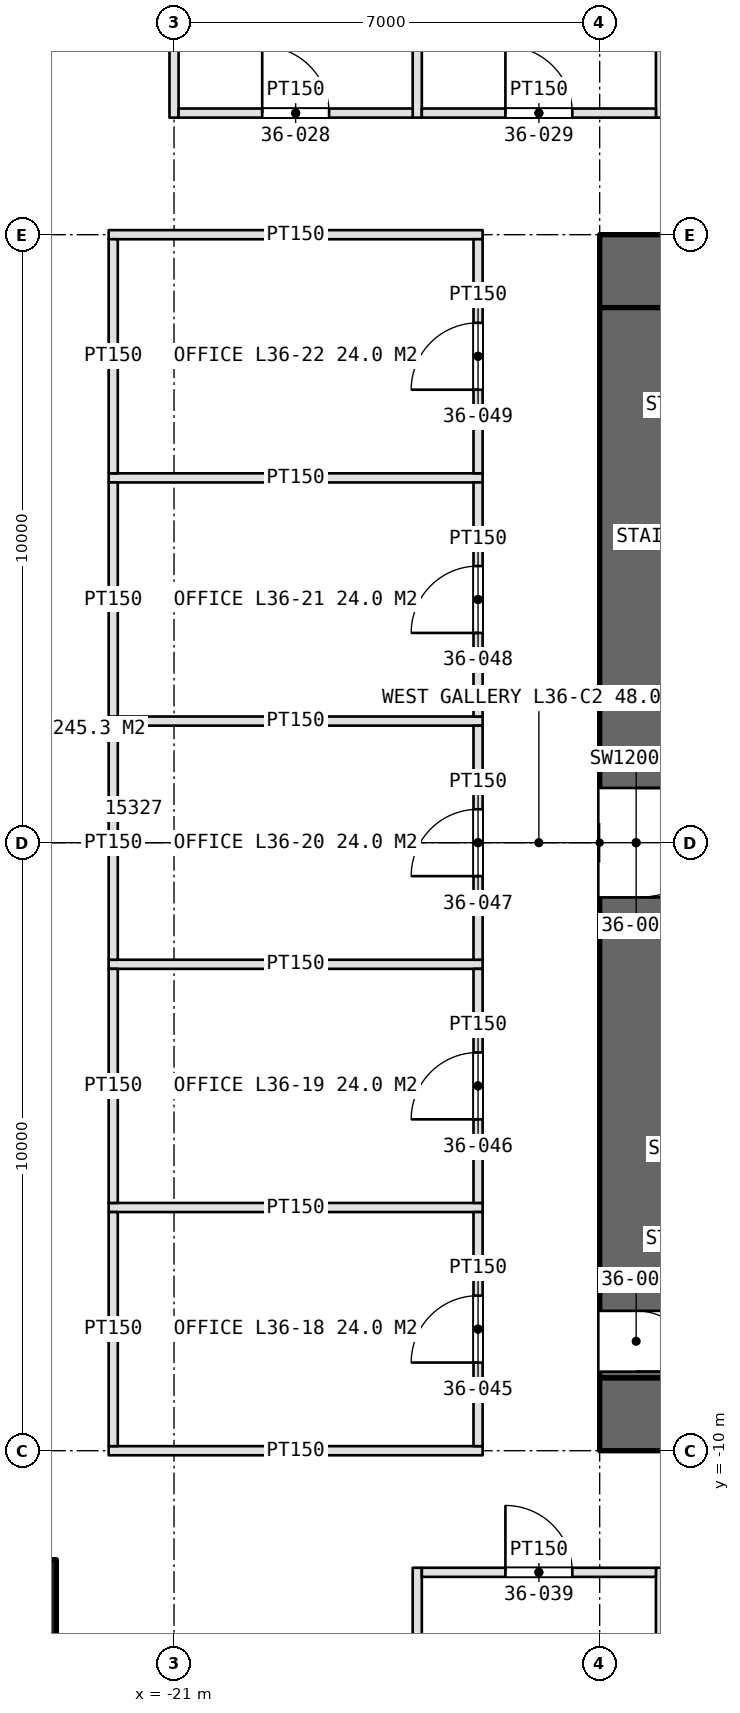
"""IFC4 building model, lengths in metres.
Left out: names, types, materials, properties, quantities, classifications, styles, units other than length and angle.
Written with IfcOpenShell. Run it as: python <this file> out.ifc"""

import sys

from ifc_helpers import new_model, si_unit, direction, frame, frame_2d, origin, origin_2d, place, context, subcontext, project, spatial, rectangle, extrude, element, fill, save


model = new_model("IFC4")
c1 = context("Model", 3, precision=1e-05, world=origin(), true_north=direction((0.0, 1.0)))
c2 = subcontext(c1, "Body", "Model", "MODEL_VIEW")
j1 = project(units=[si_unit("LENGTHUNIT", "METRE"), si_unit("PLANEANGLEUNIT", "RADIAN")], contexts=[c1])
p1 = place(None, origin())
s1 = spatial("IfcSite", under=j1, at=p1, CompositionType="ELEMENT")
p2 = place(p1, origin())
s2 = spatial("IfcBuilding", under=s1, at=p2, CompositionType="ELEMENT")
p3 = place(p2, frame((0.0, 0.0, 168.0)))
s3 = spatial("IfcBuildingStorey", under=s2, at=p3, CompositionType="ELEMENT", Elevation=168.0)
p4 = place(p3, frame((-14.0, -9.4, 0.0), z_axis=(0.0, 0.0, 1.0), x_axis=(1.0, 0.0, 0.0)))
e1 = element("IfcWall", 1, at=p4, inside=s3, PredefinedType="SHEAR", context=c2, shape_type="SweptSolid", body=[
    extrude(rectangle(XDim=28.0, YDim=1.2, at=frame_2d((14.0, 0.0))), origin(), (0.0, 0.0, 1.0), 4.2),
])
p5 = place(p4, frame((13.1, 0.0, 0.0)))
e2 = element("IfcOpeningElement", 2, at=p5, cuts=e1, PredefinedType="OPENING", context=c2, shape_type="SweptSolid", body=[
    extrude(rectangle(XDim=1.8, YDim=2.4, at=frame_2d((0.9, 1.2))), frame((0.0, 0.61, 0.0), z_axis=(0.0, -1.0, 0.0), x_axis=(1.0, 0.0, 0.0)), (0.0, 0.0, 1.0), 1.22),
])
p6 = place(p4, frame((22.9, 0.0, 0.0)))
e3 = element("IfcOpeningElement", 3, at=p6, cuts=e1, PredefinedType="OPENING", context=c2, shape_type="SweptSolid", body=[
    extrude(rectangle(XDim=2.2, YDim=2.7, at=frame_2d((1.1, 1.35))), frame((0.0, 0.61, 0.0), z_axis=(0.0, -1.0, 0.0), x_axis=(1.0, 0.0, 0.0)), (0.0, 0.0, 1.0), 1.22),
])
p7 = place(p3, frame((14.0, 9.4, 0.0), z_axis=(0.0, 0.0, 1.0), x_axis=(-1.0, 0.0, 0.0)))
e4 = element("IfcWall", 4, at=p7, inside=s3, PredefinedType="SHEAR", context=c2, shape_type="SweptSolid", body=[
    extrude(rectangle(XDim=28.0, YDim=1.2, at=frame_2d((14.0, 0.0))), origin(), (0.0, 0.0, 1.0), 4.2),
])
p8 = place(p7, frame((24.0, 0.0, 0.0)))
e5 = element("IfcOpeningElement", 5, at=p8, cuts=e4, PredefinedType="OPENING", context=c2, shape_type="SweptSolid", body=[
    extrude(rectangle(XDim=1.0, YDim=2.4, at=frame_2d((0.5, 1.2))), frame((0.0, 0.61, 0.0), z_axis=(0.0, -1.0, 0.0), x_axis=(1.0, 0.0, 0.0)), (0.0, 0.0, 1.0), 1.22),
])
p9 = place(p7, frame((13.1, 0.0, 0.0)))
e6 = element("IfcOpeningElement", 6, at=p9, cuts=e4, PredefinedType="OPENING", context=c2, shape_type="SweptSolid", body=[
    extrude(rectangle(XDim=1.8, YDim=2.4, at=frame_2d((0.9, 1.2))), frame((0.0, 0.61, 0.0), z_axis=(0.0, -1.0, 0.0), x_axis=(1.0, 0.0, 0.0)), (0.0, 0.0, 1.0), 1.22),
])
p10 = place(p3, frame((-13.4, 8.8, 0.0), z_axis=(0.0, 0.0, 1.0), x_axis=(0.0, -1.0, 0.0)))
e7 = element("IfcWall", 7, at=p10, inside=s3, PredefinedType="SHEAR", context=c2, shape_type="SweptSolid", body=[
    extrude(rectangle(XDim=17.6, YDim=1.2, at=frame_2d((8.8, 0.0))), origin(), (0.0, 0.0, 1.0), 4.2),
])
p11 = place(p10, frame((7.9, 0.0, 0.0)))
e8 = element("IfcOpeningElement", 8, at=p11, cuts=e7, PredefinedType="OPENING", context=c2, shape_type="SweptSolid", body=[
    extrude(rectangle(XDim=1.8, YDim=2.4, at=frame_2d((0.9, 1.2))), frame((0.0, 0.61, 0.0), z_axis=(0.0, -1.0, 0.0), x_axis=(1.0, 0.0, 0.0)), (0.0, 0.0, 1.0), 1.22),
])
p12 = place(p10, frame((16.5, 0.0, 0.0)))
e9 = element("IfcOpeningElement", 9, at=p12, cuts=e7, PredefinedType="OPENING", context=c2, shape_type="SweptSolid", body=[
    extrude(rectangle(XDim=1.0, YDim=2.4, at=frame_2d((0.5, 1.2))), frame((0.0, 0.61, 0.0), z_axis=(0.0, -1.0, 0.0), x_axis=(1.0, 0.0, 0.0)), (0.0, 0.0, 1.0), 1.22),
])
p13 = place(p3, frame((-23.635, -12.493, 0.0), z_axis=(0.0, 0.0, 1.0), x_axis=(1.0, 0.0, 0.0)))
e10 = element("IfcColumn", 10, at=p13, inside=s3, PredefinedType="COLUMN", context=c2, shape_type="SweptSolid", body=[
    extrude(rectangle(XDim=1.4, YDim=1.4, at=origin_2d()), origin(), (0.0, 0.0, 1.0), 4.2),
])
for number, where, z_axis, x_axis in (
    (11, (-21.0, 11.925, 0.0), (0.0, 0.0, 1.0), (0.0, 1.0, 0.0)),
    (12, (-17.0, 11.925, 0.0), (0.0, 0.0, 1.0), (0.0, 1.0, 0.0)),
    (13, (-13.0, 11.925, 0.0), (0.0, 0.0, 1.0), (0.0, 1.0, 0.0)),
):
    element("IfcWall", number, at=place(p3, frame(where, z_axis=z_axis, x_axis=x_axis)), inside=s3, PredefinedType="PARTITIONING", context=c2, shape_type="SweptSolid", body=[
        extrude(rectangle(XDim=6.15, YDim=0.15, at=frame_2d((3.075, 0.0))), origin(), (0.0, 0.0, 1.0), 3.0),
    ])
p14 = place(p3, frame((-20.925, 12.0, 0.0), z_axis=(0.0, 0.0, 1.0), x_axis=(1.0, 0.0, 0.0)))
e14 = element("IfcWall", 14, at=p14, inside=s3, PredefinedType="PARTITIONING", context=c2, shape_type="SweptSolid", body=[
    extrude(rectangle(XDim=3.85, YDim=0.15, at=frame_2d((1.925, 0.0))), origin(), (0.0, 0.0, 1.0), 3.0),
])
p15 = place(p14, frame((1.375, 0.0, 0.0)))
e15 = element("IfcOpeningElement", 15, at=p15, cuts=e14, PredefinedType="OPENING", context=c2, shape_type="SweptSolid", body=[
    extrude(rectangle(XDim=1.1, YDim=2.3, at=frame_2d((0.55, 1.15))), frame((0.0, 0.085, 0.0), z_axis=(0.0, -1.0, 0.0), x_axis=(1.0, 0.0, 0.0)), (0.0, 0.0, 1.0), 0.17),
])
p16 = place(p3, frame((-16.925, 12.0, 0.0), z_axis=(0.0, 0.0, 1.0), x_axis=(1.0, 0.0, 0.0)))
e16 = element("IfcWall", 16, at=p16, inside=s3, PredefinedType="PARTITIONING", context=c2, shape_type="SweptSolid", body=[
    extrude(rectangle(XDim=3.85, YDim=0.15, at=frame_2d((1.925, 0.0))), origin(), (0.0, 0.0, 1.0), 3.0),
])
p17 = place(p16, frame((1.375, 0.0, 0.0)))
e17 = element("IfcOpeningElement", 17, at=p17, cuts=e16, PredefinedType="OPENING", context=c2, shape_type="SweptSolid", body=[
    extrude(rectangle(XDim=1.1, YDim=2.3, at=frame_2d((0.55, 1.15))), frame((0.0, 0.085, 0.0), z_axis=(0.0, -1.0, 0.0), x_axis=(1.0, 0.0, 0.0)), (0.0, 0.0, 1.0), 0.17),
])
for number, where, z_axis, x_axis in (
    (18, (-17.0, -11.925, 0.0), (0.0, 0.0, 1.0), (0.0, -1.0, 0.0)),
    (19, (-13.0, -11.925, 0.0), (0.0, 0.0, 1.0), (0.0, -1.0, 0.0)),
):
    element("IfcWall", number, at=place(p3, frame(where, z_axis=z_axis, x_axis=x_axis)), inside=s3, PredefinedType="PARTITIONING", context=c2, shape_type="SweptSolid", body=[
        extrude(rectangle(XDim=6.15, YDim=0.15, at=frame_2d((3.075, 0.0))), origin(), (0.0, 0.0, 1.0), 3.0),
    ])
p18 = place(p3, frame((-16.925, -12.0, 0.0), z_axis=(0.0, 0.0, 1.0), x_axis=(1.0, 0.0, 0.0)))
e20 = element("IfcWall", 20, at=p18, inside=s3, PredefinedType="PARTITIONING", context=c2, shape_type="SweptSolid", body=[
    extrude(rectangle(XDim=3.85, YDim=0.15, at=frame_2d((1.925, 0.0))), origin(), (0.0, 0.0, 1.0), 3.0),
])
p19 = place(p18, frame((1.375, 0.0, 0.0)))
e21 = element("IfcOpeningElement", 21, at=p19, cuts=e20, PredefinedType="OPENING", context=c2, shape_type="SweptSolid", body=[
    extrude(rectangle(XDim=1.1, YDim=2.3, at=frame_2d((0.55, 1.15))), frame((0.0, 0.085, 0.0), z_axis=(0.0, -1.0, 0.0), x_axis=(1.0, 0.0, 0.0)), (0.0, 0.0, 1.0), 0.17),
])
for number, where, z_axis, x_axis in (
    (22, (-15.925, -10.0, 0.0), (0.0, 0.0, 1.0), (-1.0, 0.0, 0.0)),
    (23, (-15.925, -6.0, 0.0), (0.0, 0.0, 1.0), (-1.0, 0.0, 0.0)),
    (24, (-15.925, -2.0, 0.0), (0.0, 0.0, 1.0), (-1.0, 0.0, 0.0)),
    (25, (-15.925, 2.0, 0.0), (0.0, 0.0, 1.0), (-1.0, 0.0, 0.0)),
    (26, (-15.925, 6.0, 0.0), (0.0, 0.0, 1.0), (-1.0, 0.0, 0.0)),
    (27, (-15.925, 10.0, 0.0), (0.0, 0.0, 1.0), (-1.0, 0.0, 0.0)),
):
    element("IfcWall", number, at=place(p3, frame(where, z_axis=z_axis, x_axis=x_axis)), inside=s3, PredefinedType="PARTITIONING", context=c2, shape_type="SweptSolid", body=[
        extrude(rectangle(XDim=6.15, YDim=0.15, at=frame_2d((3.075, 0.0))), origin(), (0.0, 0.0, 1.0), 3.0),
    ])
p20 = place(p3, frame((-16.0, -9.925, 0.0), z_axis=(0.0, 0.0, 1.0), x_axis=(0.0, 1.0, 0.0)))
e28 = element("IfcWall", 28, at=p20, inside=s3, PredefinedType="PARTITIONING", context=c2, shape_type="SweptSolid", body=[
    extrude(rectangle(XDim=3.85, YDim=0.15, at=frame_2d((1.925, 0.0))), origin(), (0.0, 0.0, 1.0), 3.0),
])
p21 = place(p20, frame((1.375, 0.0, 0.0)))
e29 = element("IfcOpeningElement", 29, at=p21, cuts=e28, PredefinedType="OPENING", context=c2, shape_type="SweptSolid", body=[
    extrude(rectangle(XDim=1.1, YDim=2.3, at=frame_2d((0.55, 1.15))), frame((0.0, 0.085, 0.0), z_axis=(0.0, -1.0, 0.0), x_axis=(1.0, 0.0, 0.0)), (0.0, 0.0, 1.0), 0.17),
])
p22 = place(p3, frame((-22.0, -9.925, 0.0), z_axis=(0.0, 0.0, 1.0), x_axis=(0.0, 1.0, 0.0)))
e30 = element("IfcWall", 30, at=p22, inside=s3, PredefinedType="PARTITIONING", context=c2, shape_type="SweptSolid", body=[
    extrude(rectangle(XDim=3.85, YDim=0.15, at=frame_2d((1.925, 0.0))), origin(), (0.0, 0.0, 1.0), 3.0),
])
p23 = place(p3, frame((-16.0, -5.925, 0.0), z_axis=(0.0, 0.0, 1.0), x_axis=(0.0, 1.0, 0.0)))
e31 = element("IfcWall", 31, at=p23, inside=s3, PredefinedType="PARTITIONING", context=c2, shape_type="SweptSolid", body=[
    extrude(rectangle(XDim=3.85, YDim=0.15, at=frame_2d((1.925, 0.0))), origin(), (0.0, 0.0, 1.0), 3.0),
])
p24 = place(p23, frame((1.375, 0.0, 0.0)))
e32 = element("IfcOpeningElement", 32, at=p24, cuts=e31, PredefinedType="OPENING", context=c2, shape_type="SweptSolid", body=[
    extrude(rectangle(XDim=1.1, YDim=2.3, at=frame_2d((0.55, 1.15))), frame((0.0, 0.085, 0.0), z_axis=(0.0, -1.0, 0.0), x_axis=(1.0, 0.0, 0.0)), (0.0, 0.0, 1.0), 0.17),
])
p25 = place(p3, frame((-22.0, -5.925, 0.0), z_axis=(0.0, 0.0, 1.0), x_axis=(0.0, 1.0, 0.0)))
e33 = element("IfcWall", 33, at=p25, inside=s3, PredefinedType="PARTITIONING", context=c2, shape_type="SweptSolid", body=[
    extrude(rectangle(XDim=3.85, YDim=0.15, at=frame_2d((1.925, 0.0))), origin(), (0.0, 0.0, 1.0), 3.0),
])
p26 = place(p3, frame((-16.0, -1.925, 0.0), z_axis=(0.0, 0.0, 1.0), x_axis=(0.0, 1.0, 0.0)))
e34 = element("IfcWall", 34, at=p26, inside=s3, PredefinedType="PARTITIONING", context=c2, shape_type="SweptSolid", body=[
    extrude(rectangle(XDim=3.85, YDim=0.15, at=frame_2d((1.925, 0.0))), origin(), (0.0, 0.0, 1.0), 3.0),
])
p27 = place(p26, frame((1.375, 0.0, 0.0)))
e35 = element("IfcOpeningElement", 35, at=p27, cuts=e34, PredefinedType="OPENING", context=c2, shape_type="SweptSolid", body=[
    extrude(rectangle(XDim=1.1, YDim=2.3, at=frame_2d((0.55, 1.15))), frame((0.0, 0.085, 0.0), z_axis=(0.0, -1.0, 0.0), x_axis=(1.0, 0.0, 0.0)), (0.0, 0.0, 1.0), 0.17),
])
p28 = place(p3, frame((-22.0, -1.925, 0.0), z_axis=(0.0, 0.0, 1.0), x_axis=(0.0, 1.0, 0.0)))
e36 = element("IfcWall", 36, at=p28, inside=s3, PredefinedType="PARTITIONING", context=c2, shape_type="SweptSolid", body=[
    extrude(rectangle(XDim=3.85, YDim=0.15, at=frame_2d((1.925, 0.0))), origin(), (0.0, 0.0, 1.0), 3.0),
])
p29 = place(p3, frame((-16.0, 2.075, 0.0), z_axis=(0.0, 0.0, 1.0), x_axis=(0.0, 1.0, 0.0)))
e37 = element("IfcWall", 37, at=p29, inside=s3, PredefinedType="PARTITIONING", context=c2, shape_type="SweptSolid", body=[
    extrude(rectangle(XDim=3.85, YDim=0.15, at=frame_2d((1.925, 0.0))), origin(), (0.0, 0.0, 1.0), 3.0),
])
p30 = place(p29, frame((1.375, 0.0, 0.0)))
e38 = element("IfcOpeningElement", 38, at=p30, cuts=e37, PredefinedType="OPENING", context=c2, shape_type="SweptSolid", body=[
    extrude(rectangle(XDim=1.1, YDim=2.3, at=frame_2d((0.55, 1.15))), frame((0.0, 0.085, 0.0), z_axis=(0.0, -1.0, 0.0), x_axis=(1.0, 0.0, 0.0)), (0.0, 0.0, 1.0), 0.17),
])
p31 = place(p3, frame((-22.0, 2.075, 0.0), z_axis=(0.0, 0.0, 1.0), x_axis=(0.0, 1.0, 0.0)))
e39 = element("IfcWall", 39, at=p31, inside=s3, PredefinedType="PARTITIONING", context=c2, shape_type="SweptSolid", body=[
    extrude(rectangle(XDim=3.85, YDim=0.15, at=frame_2d((1.925, 0.0))), origin(), (0.0, 0.0, 1.0), 3.0),
])
p32 = place(p3, frame((-16.0, 6.075, 0.0), z_axis=(0.0, 0.0, 1.0), x_axis=(0.0, 1.0, 0.0)))
e40 = element("IfcWall", 40, at=p32, inside=s3, PredefinedType="PARTITIONING", context=c2, shape_type="SweptSolid", body=[
    extrude(rectangle(XDim=3.85, YDim=0.15, at=frame_2d((1.925, 0.0))), origin(), (0.0, 0.0, 1.0), 3.0),
])
p33 = place(p32, frame((1.375, 0.0, 0.0)))
e41 = element("IfcOpeningElement", 41, at=p33, cuts=e40, PredefinedType="OPENING", context=c2, shape_type="SweptSolid", body=[
    extrude(rectangle(XDim=1.1, YDim=2.3, at=frame_2d((0.55, 1.15))), frame((0.0, 0.085, 0.0), z_axis=(0.0, -1.0, 0.0), x_axis=(1.0, 0.0, 0.0)), (0.0, 0.0, 1.0), 0.17),
])
p34 = place(p3, frame((-22.0, 6.075, 0.0), z_axis=(0.0, 0.0, 1.0), x_axis=(0.0, 1.0, 0.0)))
e42 = element("IfcWall", 42, at=p34, inside=s3, PredefinedType="PARTITIONING", context=c2, shape_type="SweptSolid", body=[
    extrude(rectangle(XDim=3.85, YDim=0.15, at=frame_2d((1.925, 0.0))), origin(), (0.0, 0.0, 1.0), 3.0),
])
p35 = place(p11, origin())
e43 = element("IfcDoor", 43, at=p35, inside=s3, OperationType="DOUBLE_DOOR_SINGLE_SWING", PredefinedType="DOOR", context=c2, shape_type="SweptSolid", body=[
    extrude(rectangle(XDim=1.8, YDim=2.4, at=frame_2d((0.9, 1.2))), frame((0.0, 0.025, 0.0), z_axis=(0.0, -1.0, 0.0), x_axis=(1.0, 0.0, 0.0)), (0.0, 0.0, 1.0), 0.05),
])
fill(e8, e43)
p36 = place(p12, origin())
e44 = element("IfcDoor", 44, at=p36, inside=s3, OperationType="SINGLE_SWING_RIGHT", PredefinedType="DOOR", context=c2, shape_type="SweptSolid", body=[
    extrude(rectangle(XDim=1.0, YDim=2.4, at=frame_2d((0.5, 1.2))), frame((0.0, 0.025, 0.0), z_axis=(0.0, -1.0, 0.0), x_axis=(1.0, 0.0, 0.0)), (0.0, 0.0, 1.0), 0.05),
])
fill(e9, e44)
p37 = place(p15, origin())
e45 = element("IfcDoor", 45, at=p37, inside=s3, OperationType="SINGLE_SWING_LEFT", PredefinedType="DOOR", context=c2, shape_type="SweptSolid", body=[
    extrude(rectangle(XDim=1.1, YDim=2.3, at=frame_2d((0.55, 1.15))), frame((0.0, 0.025, 0.0), z_axis=(0.0, -1.0, 0.0), x_axis=(1.0, 0.0, 0.0)), (0.0, 0.0, 1.0), 0.05),
])
fill(e15, e45)
p38 = place(p17, origin())
e46 = element("IfcDoor", 46, at=p38, inside=s3, OperationType="SINGLE_SWING_LEFT", PredefinedType="DOOR", context=c2, shape_type="SweptSolid", body=[
    extrude(rectangle(XDim=1.1, YDim=2.3, at=frame_2d((0.55, 1.15))), frame((0.0, 0.025, 0.0), z_axis=(0.0, -1.0, 0.0), x_axis=(1.0, 0.0, 0.0)), (0.0, 0.0, 1.0), 0.05),
])
fill(e17, e46)
p39 = place(p19, origin())
e47 = element("IfcDoor", 47, at=p39, inside=s3, OperationType="SINGLE_SWING_LEFT", PredefinedType="DOOR", context=c2, shape_type="SweptSolid", body=[
    extrude(rectangle(XDim=1.1, YDim=2.3, at=frame_2d((0.55, 1.15))), frame((0.0, 0.025, 0.0), z_axis=(0.0, -1.0, 0.0), x_axis=(1.0, 0.0, 0.0)), (0.0, 0.0, 1.0), 0.05),
])
fill(e21, e47)
p40 = place(p21, origin())
e48 = element("IfcDoor", 48, at=p40, inside=s3, OperationType="SINGLE_SWING_LEFT", PredefinedType="DOOR", context=c2, shape_type="SweptSolid", body=[
    extrude(rectangle(XDim=1.1, YDim=2.3, at=frame_2d((0.55, 1.15))), frame((0.0, 0.025, 0.0), z_axis=(0.0, -1.0, 0.0), x_axis=(1.0, 0.0, 0.0)), (0.0, 0.0, 1.0), 0.05),
])
fill(e29, e48)
p41 = place(p24, origin())
e49 = element("IfcDoor", 49, at=p41, inside=s3, OperationType="SINGLE_SWING_LEFT", PredefinedType="DOOR", context=c2, shape_type="SweptSolid", body=[
    extrude(rectangle(XDim=1.1, YDim=2.3, at=frame_2d((0.55, 1.15))), frame((0.0, 0.025, 0.0), z_axis=(0.0, -1.0, 0.0), x_axis=(1.0, 0.0, 0.0)), (0.0, 0.0, 1.0), 0.05),
])
fill(e32, e49)
p42 = place(p27, origin())
e50 = element("IfcDoor", 50, at=p42, inside=s3, OperationType="SINGLE_SWING_LEFT", PredefinedType="DOOR", context=c2, shape_type="SweptSolid", body=[
    extrude(rectangle(XDim=1.1, YDim=2.3, at=frame_2d((0.55, 1.15))), frame((0.0, 0.025, 0.0), z_axis=(0.0, -1.0, 0.0), x_axis=(1.0, 0.0, 0.0)), (0.0, 0.0, 1.0), 0.05),
])
fill(e35, e50)
p43 = place(p30, origin())
e51 = element("IfcDoor", 51, at=p43, inside=s3, OperationType="SINGLE_SWING_LEFT", PredefinedType="DOOR", context=c2, shape_type="SweptSolid", body=[
    extrude(rectangle(XDim=1.1, YDim=2.3, at=frame_2d((0.55, 1.15))), frame((0.0, 0.025, 0.0), z_axis=(0.0, -1.0, 0.0), x_axis=(1.0, 0.0, 0.0)), (0.0, 0.0, 1.0), 0.05),
])
fill(e38, e51)
p44 = place(p33, origin())
e52 = element("IfcDoor", 52, at=p44, inside=s3, OperationType="SINGLE_SWING_LEFT", PredefinedType="DOOR", context=c2, shape_type="SweptSolid", body=[
    extrude(rectangle(XDim=1.1, YDim=2.3, at=frame_2d((0.55, 1.15))), frame((0.0, 0.025, 0.0), z_axis=(0.0, -1.0, 0.0), x_axis=(1.0, 0.0, 0.0)), (0.0, 0.0, 1.0), 0.05),
])
fill(e41, e52)
save(model, sys.argv[1])
